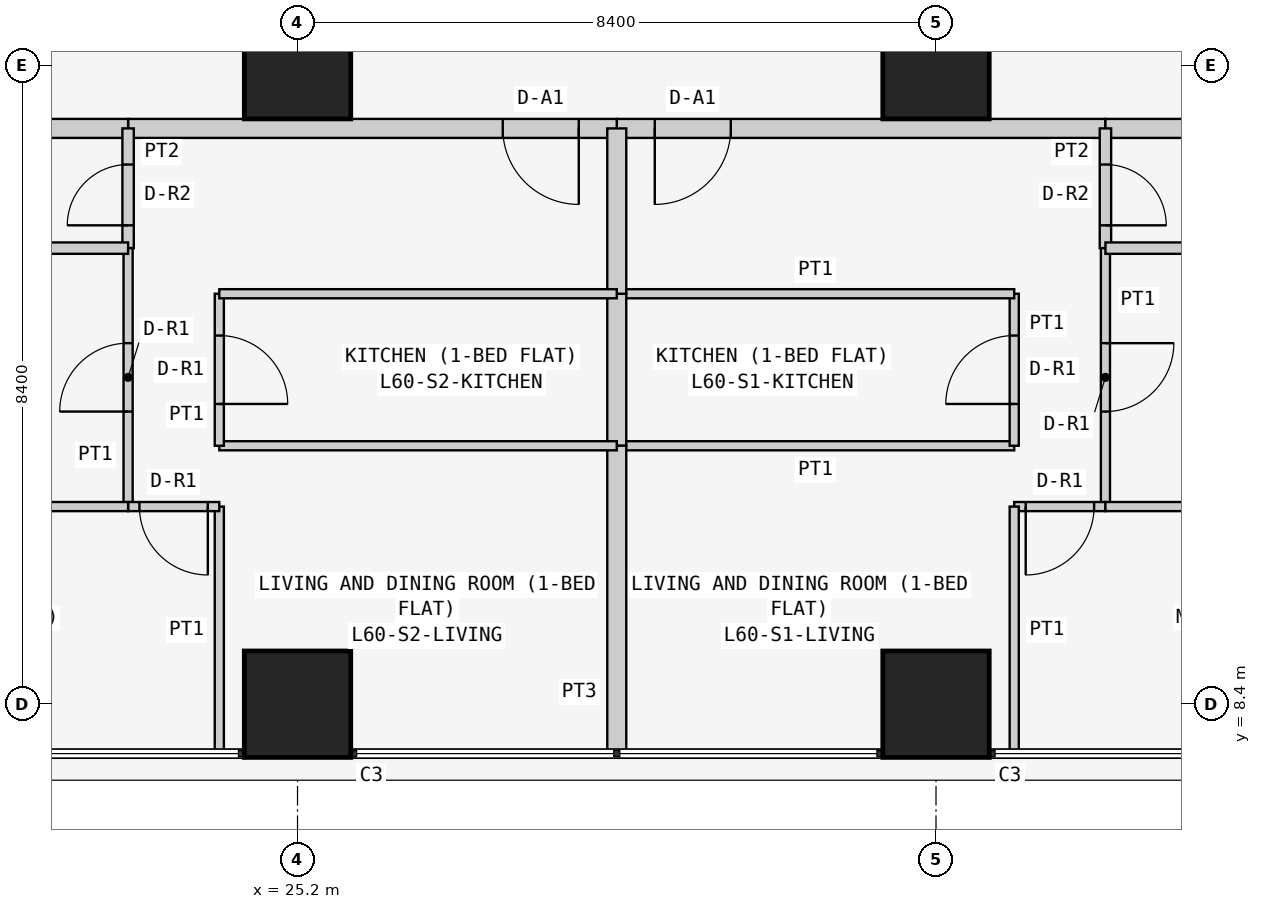
"""IFC4 building model, lengths in metres.
Left out: names, types, materials, properties, quantities, classifications, styles, units other than length and angle.
Written with IfcOpenShell. Run it as: python <this file> out.ifc"""

import sys

from ifc_helpers import new_model, si_unit, direction, frame, frame_2d, origin, origin_2d, place, context, subcontext, project, spatial, rectangle, extrude, element, fill, save


model = new_model("IFC4")
c1 = context("Model", 3, precision=1e-05, world=origin(), true_north=direction((0.0, 1.0)))
c2 = subcontext(c1, "Body", "Model", "MODEL_VIEW")
j1 = project(units=[si_unit("LENGTHUNIT", "METRE"), si_unit("PLANEANGLEUNIT", "RADIAN")], contexts=[c1])
p1 = place(None, origin())
s1 = spatial("IfcSite", under=j1, at=p1, CompositionType="ELEMENT")
p2 = place(p1, origin())
s2 = spatial("IfcBuilding", under=s1, at=p2, CompositionType="ELEMENT")
p3 = place(p2, frame((0.0, 0.0, 230.1)))
s3 = spatial("IfcBuildingStorey", under=s2, at=p3, CompositionType="ELEMENT", Elevation=230.1)
for number, where, z_axis, x_axis in (
    (1, (25.2, 8.4, 0.0), (0.0, 0.0, 1.0), (1.0, 0.0, 0.0)),
    (2, (25.2, 16.8, 0.0), (0.0, 0.0, 1.0), (1.0, 0.0, 0.0)),
    (3, (33.6, 8.4, 0.0), (0.0, 0.0, 1.0), (1.0, 0.0, 0.0)),
    (4, (33.6, 16.8, 0.0), (0.0, 0.0, 1.0), (1.0, 0.0, 0.0)),
):
    element("IfcColumn", number, at=place(p3, frame(where, z_axis=z_axis, x_axis=x_axis)), inside=s3, PredefinedType="COLUMN", context=c2, shape_type="SweptSolid", body=[
        extrude(rectangle(XDim=1.4, YDim=1.4, at=origin_2d()), origin(), (0.0, 0.0, 1.0), 3.6),
    ])
p4 = place(p3, frame((35.829, 15.975, 0.0), z_axis=(0.0, 0.0, 1.0), x_axis=(-1.0, 0.0, 0.0)))
e5 = element("IfcWall", 5, at=p4, inside=s3, PredefinedType="PARTITIONING", context=c2, shape_type="SweptSolid", body=[
    extrude(rectangle(XDim=6.429, YDim=0.25, at=frame_2d((3.215, 0.0))), origin(), (0.0, 0.0, 1.0), 3.45),
])
p5 = place(p4, frame((4.929, 0.0, 0.0)))
e6 = element("IfcOpeningElement", 6, at=p5, cuts=e5, PredefinedType="OPENING", context=c2, shape_type="SweptSolid", body=[
    extrude(rectangle(XDim=1.0, YDim=2.1, at=frame_2d((0.5, 1.05))), frame((0.0, 0.135, 0.0), z_axis=(0.0, -1.0, 0.0), x_axis=(1.0, 0.0, 0.0)), (0.0, 0.0, 1.0), 0.27),
])
p6 = place(p3, frame((42.7, 15.975, 0.0), z_axis=(0.0, 0.0, 1.0), x_axis=(-1.0, 0.0, 0.0)))
e7 = element("IfcWall", 7, at=p6, inside=s3, PredefinedType="PARTITIONING", context=c2, shape_type="SweptSolid", body=[
    extrude(rectangle(XDim=6.871, YDim=0.25, at=frame_2d((3.436, 0.0))), origin(), (0.0, 0.0, 1.0), 3.45),
])
p7 = place(p3, frame((29.4, 15.975, 0.0), z_axis=(0.0, 0.0, 1.0), x_axis=(-1.0, 0.0, 0.0)))
e8 = element("IfcWall", 8, at=p7, inside=s3, PredefinedType="PARTITIONING", context=c2, shape_type="SweptSolid", body=[
    extrude(rectangle(XDim=6.429, YDim=0.25, at=frame_2d((3.214, 0.0))), origin(), (0.0, 0.0, 1.0), 3.45),
])
p8 = place(p7, frame((0.5, 0.0, 0.0)))
e9 = element("IfcOpeningElement", 9, at=p8, cuts=e8, PredefinedType="OPENING", context=c2, shape_type="SweptSolid", body=[
    extrude(rectangle(XDim=1.0, YDim=2.1, at=frame_2d((0.5, 1.05))), frame((0.0, 0.135, 0.0), z_axis=(0.0, -1.0, 0.0), x_axis=(1.0, 0.0, 0.0)), (0.0, 0.0, 1.0), 0.27),
])
p9 = place(p3, frame((22.971, 15.975, 0.0), z_axis=(0.0, 0.0, 1.0), x_axis=(-1.0, 0.0, 0.0)))
e10 = element("IfcWall", 10, at=p9, inside=s3, PredefinedType="PARTITIONING", context=c2, shape_type="SweptSolid", body=[
    extrude(rectangle(XDim=6.871, YDim=0.25, at=frame_2d((3.436, 0.0))), origin(), (0.0, 0.0, 1.0), 3.45),
])
p10 = place(p3, frame((29.4, 11.8, 0.0), z_axis=(0.0, 0.0, 1.0), x_axis=(1.0, 0.0, 0.0)))
e11 = element("IfcWall", 11, at=p10, inside=s3, PredefinedType="PARTITIONING", context=c2, shape_type="SweptSolid", body=[
    extrude(rectangle(XDim=5.229, YDim=0.12, at=frame_2d((2.615, 0.0))), origin(), (0.0, 0.0, 1.0), 3.45),
])
p11 = place(p3, frame((34.629, 11.8, 0.0), z_axis=(0.0, 0.0, 1.0), x_axis=(0.0, 1.0, 0.0)))
e12 = element("IfcWall", 12, at=p11, inside=s3, PredefinedType="PARTITIONING", context=c2, shape_type="SweptSolid", body=[
    extrude(rectangle(XDim=2.0, YDim=0.12, at=frame_2d((1.0, 0.0))), origin(), (0.0, 0.0, 1.0), 3.45),
])
p12 = place(p11, frame((0.55, 0.0, 0.0)))
e13 = element("IfcOpeningElement", 13, at=p12, cuts=e12, PredefinedType="OPENING", context=c2, shape_type="SweptSolid", body=[
    extrude(rectangle(XDim=0.9, YDim=2.1, at=frame_2d((0.45, 1.05))), frame((0.0, 0.07, 0.0), z_axis=(0.0, -1.0, 0.0), x_axis=(1.0, 0.0, 0.0)), (0.0, 0.0, 1.0), 0.14),
])
p13 = place(p3, frame((34.629, 13.8, 0.0), z_axis=(0.0, 0.0, 1.0), x_axis=(-1.0, 0.0, 0.0)))
e14 = element("IfcWall", 14, at=p13, inside=s3, PredefinedType="PARTITIONING", context=c2, shape_type="SweptSolid", body=[
    extrude(rectangle(XDim=5.229, YDim=0.12, at=frame_2d((2.615, 0.0))), origin(), (0.0, 0.0, 1.0), 3.45),
])
p14 = place(p3, frame((29.4, 13.8, 0.0), z_axis=(0.0, 0.0, 1.0), x_axis=(0.0, -1.0, 0.0)))
e15 = element("IfcWall", 15, at=p14, inside=s3, PredefinedType="PARTITIONING", context=c2, shape_type="SweptSolid", body=[
    extrude(rectangle(XDim=2.0, YDim=0.25, at=frame_2d((1.0, 0.0))), origin(), (0.0, 0.0, 1.0), 2.848),
])
p15 = place(p3, frame((35.829, 15.975, 0.0), z_axis=(0.0, 0.0, 1.0), x_axis=(0.0, -1.0, 0.0)))
e16 = element("IfcWall", 16, at=p15, inside=s3, PredefinedType="PARTITIONING", context=c2, shape_type="SweptSolid", body=[
    extrude(rectangle(XDim=1.575, YDim=0.15, at=frame_2d((0.788, 0.0))), origin(), (0.0, 0.0, 1.0), 3.45),
])
p16 = place(p15, frame((0.475, 0.0, 0.0)))
e17 = element("IfcOpeningElement", 17, at=p16, cuts=e16, PredefinedType="OPENING", context=c2, shape_type="SweptSolid", body=[
    extrude(rectangle(XDim=0.8, YDim=2.1, at=frame_2d((0.4, 1.05))), frame((0.0, 0.085, 0.0), z_axis=(0.0, -1.0, 0.0), x_axis=(1.0, 0.0, 0.0)), (0.0, 0.0, 1.0), 0.17),
])
p17 = place(p3, frame((35.829, 14.4, 0.0), z_axis=(0.0, 0.0, 1.0), x_axis=(0.0, -1.0, 0.0)))
e18 = element("IfcWall", 18, at=p17, inside=s3, PredefinedType="PARTITIONING", context=c2, shape_type="SweptSolid", body=[
    extrude(rectangle(XDim=3.4, YDim=0.12, at=frame_2d((1.7, 0.0))), origin(), (0.0, 0.0, 1.0), 3.45),
])
p18 = place(p17, frame((1.25, 0.0, 0.0)))
e19 = element("IfcOpeningElement", 19, at=p18, cuts=e18, PredefinedType="OPENING", context=c2, shape_type="SweptSolid", body=[
    extrude(rectangle(XDim=0.9, YDim=2.1, at=frame_2d((0.45, 1.05))), frame((0.0, 0.07, 0.0), z_axis=(0.0, -1.0, 0.0), x_axis=(1.0, 0.0, 0.0)), (0.0, 0.0, 1.0), 0.14),
])
p19 = place(p3, frame((35.829, 11.0, 0.0), z_axis=(0.0, 0.0, 1.0), x_axis=(-1.0, 0.0, 0.0)))
e20 = element("IfcWall", 20, at=p19, inside=s3, PredefinedType="PARTITIONING", context=c2, shape_type="SweptSolid", body=[
    extrude(rectangle(XDim=1.2, YDim=0.12, at=frame_2d((0.6, 0.0))), origin(), (0.0, 0.0, 1.0), 3.45),
])
p20 = place(p19, frame((0.149, 0.0, 0.0)))
e21 = element("IfcOpeningElement", 21, at=p20, cuts=e20, PredefinedType="OPENING", context=c2, shape_type="SweptSolid", body=[
    extrude(rectangle(XDim=0.9, YDim=2.1, at=frame_2d((0.45, 1.05))), frame((0.0, 0.07, 0.0), z_axis=(0.0, -1.0, 0.0), x_axis=(1.0, 0.0, 0.0)), (0.0, 0.0, 1.0), 0.14),
])
p21 = place(p3, frame((34.629, 11.0, 0.0), z_axis=(0.0, 0.0, 1.0), x_axis=(0.0, -1.0, 0.0)))
e22 = element("IfcWall", 22, at=p21, inside=s3, PredefinedType="PARTITIONING", context=c2, shape_type="SweptSolid", body=[
    extrude(rectangle(XDim=3.25, YDim=0.12, at=frame_2d((1.625, 0.0))), origin(), (0.0, 0.0, 1.0), 3.45),
])
p22 = place(p3, frame((29.4, 7.75, 0.0), z_axis=(0.0, 0.0, 1.0), x_axis=(0.0, 1.0, 0.0)))
e23 = element("IfcWall", 23, at=p22, inside=s3, PredefinedType="PARTITIONING", context=c2, shape_type="SweptSolid", body=[
    extrude(rectangle(XDim=4.05, YDim=0.25, at=frame_2d((2.025, 0.0))), origin(), (0.0, 0.0, 1.0), 2.848),
])
p23 = place(p3, frame((29.4, 13.8, 0.0), z_axis=(0.0, 0.0, 1.0), x_axis=(0.0, 1.0, 0.0)))
e24 = element("IfcWall", 24, at=p23, inside=s3, PredefinedType="PARTITIONING", context=c2, shape_type="SweptSolid", body=[
    extrude(rectangle(XDim=2.175, YDim=0.25, at=frame_2d((1.087, 0.0))), origin(), (0.0, 0.0, 1.0), 2.848),
])
p24 = place(p3, frame((35.829, 14.4, 0.0), z_axis=(0.0, 0.0, 1.0), x_axis=(1.0, 0.0, 0.0)))
e25 = element("IfcWall", 25, at=p24, inside=s3, PredefinedType="PARTITIONING", context=c2, shape_type="SweptSolid", body=[
    extrude(rectangle(XDim=6.871, YDim=0.15, at=frame_2d((3.436, 0.0))), origin(), (0.0, 0.0, 1.0), 3.45),
])
p25 = place(p3, frame((35.829, 11.0, 0.0), z_axis=(0.0, 0.0, 1.0), x_axis=(1.0, 0.0, 0.0)))
e26 = element("IfcWall", 26, at=p25, inside=s3, PredefinedType="PARTITIONING", context=c2, shape_type="SweptSolid", body=[
    extrude(rectangle(XDim=6.871, YDim=0.12, at=frame_2d((3.436, 0.0))), origin(), (0.0, 0.0, 1.0), 3.45),
])
p26 = place(p3, frame((29.4, 11.8, 0.0), z_axis=(0.0, 0.0, 1.0), x_axis=(-1.0, 0.0, 0.0)))
e27 = element("IfcWall", 27, at=p26, inside=s3, PredefinedType="PARTITIONING", context=c2, shape_type="SweptSolid", body=[
    extrude(rectangle(XDim=5.229, YDim=0.12, at=frame_2d((2.615, 0.0))), origin(), (0.0, 0.0, 1.0), 3.45),
])
p27 = place(p3, frame((24.171, 11.8, 0.0), z_axis=(0.0, 0.0, 1.0), x_axis=(0.0, 1.0, 0.0)))
e28 = element("IfcWall", 28, at=p27, inside=s3, PredefinedType="PARTITIONING", context=c2, shape_type="SweptSolid", body=[
    extrude(rectangle(XDim=2.0, YDim=0.12, at=frame_2d((1.0, 0.0))), origin(), (0.0, 0.0, 1.0), 3.45),
])
p28 = place(p27, frame((0.55, 0.0, 0.0)))
e29 = element("IfcOpeningElement", 29, at=p28, cuts=e28, PredefinedType="OPENING", context=c2, shape_type="SweptSolid", body=[
    extrude(rectangle(XDim=0.9, YDim=2.1, at=frame_2d((0.45, 1.05))), frame((0.0, 0.07, 0.0), z_axis=(0.0, -1.0, 0.0), x_axis=(1.0, 0.0, 0.0)), (0.0, 0.0, 1.0), 0.14),
])
p29 = place(p3, frame((24.171, 13.8, 0.0), z_axis=(0.0, 0.0, 1.0), x_axis=(1.0, 0.0, 0.0)))
e30 = element("IfcWall", 30, at=p29, inside=s3, PredefinedType="PARTITIONING", context=c2, shape_type="SweptSolid", body=[
    extrude(rectangle(XDim=5.229, YDim=0.12, at=frame_2d((2.615, 0.0))), origin(), (0.0, 0.0, 1.0), 3.45),
])
p30 = place(p3, frame((22.971, 14.4, 0.0), z_axis=(0.0, 0.0, 1.0), x_axis=(0.0, 1.0, 0.0)))
e31 = element("IfcWall", 31, at=p30, inside=s3, PredefinedType="PARTITIONING", context=c2, shape_type="SweptSolid", body=[
    extrude(rectangle(XDim=1.575, YDim=0.15, at=frame_2d((0.788, 0.0))), origin(), (0.0, 0.0, 1.0), 3.45),
])
p31 = place(p30, frame((0.3, 0.0, 0.0)))
e32 = element("IfcOpeningElement", 32, at=p31, cuts=e31, PredefinedType="OPENING", context=c2, shape_type="SweptSolid", body=[
    extrude(rectangle(XDim=0.8, YDim=2.1, at=frame_2d((0.4, 1.05))), frame((0.0, 0.085, 0.0), z_axis=(0.0, -1.0, 0.0), x_axis=(1.0, 0.0, 0.0)), (0.0, 0.0, 1.0), 0.17),
])
p32 = place(p3, frame((22.971, 11.0, 0.0), z_axis=(0.0, 0.0, 1.0), x_axis=(0.0, 1.0, 0.0)))
e33 = element("IfcWall", 33, at=p32, inside=s3, PredefinedType="PARTITIONING", context=c2, shape_type="SweptSolid", body=[
    extrude(rectangle(XDim=3.4, YDim=0.12, at=frame_2d((1.7, 0.0))), origin(), (0.0, 0.0, 1.0), 3.45),
])
p33 = place(p32, frame((1.25, 0.0, 0.0)))
e34 = element("IfcOpeningElement", 34, at=p33, cuts=e33, PredefinedType="OPENING", context=c2, shape_type="SweptSolid", body=[
    extrude(rectangle(XDim=0.9, YDim=2.1, at=frame_2d((0.45, 1.05))), frame((0.0, 0.07, 0.0), z_axis=(0.0, -1.0, 0.0), x_axis=(1.0, 0.0, 0.0)), (0.0, 0.0, 1.0), 0.14),
])
p34 = place(p3, frame((24.171, 7.75, 0.0), z_axis=(0.0, 0.0, 1.0), x_axis=(0.0, 1.0, 0.0)))
e35 = element("IfcWall", 35, at=p34, inside=s3, PredefinedType="PARTITIONING", context=c2, shape_type="SweptSolid", body=[
    extrude(rectangle(XDim=3.25, YDim=0.12, at=frame_2d((1.625, 0.0))), origin(), (0.0, 0.0, 1.0), 3.45),
])
p35 = place(p3, frame((24.171, 11.0, 0.0), z_axis=(0.0, 0.0, 1.0), x_axis=(-1.0, 0.0, 0.0)))
e36 = element("IfcWall", 36, at=p35, inside=s3, PredefinedType="PARTITIONING", context=c2, shape_type="SweptSolid", body=[
    extrude(rectangle(XDim=1.2, YDim=0.12, at=frame_2d((0.6, 0.0))), origin(), (0.0, 0.0, 1.0), 3.45),
])
p36 = place(p35, frame((0.151, 0.0, 0.0)))
e37 = element("IfcOpeningElement", 37, at=p36, cuts=e36, PredefinedType="OPENING", context=c2, shape_type="SweptSolid", body=[
    extrude(rectangle(XDim=0.9, YDim=2.1, at=frame_2d((0.45, 1.05))), frame((0.0, 0.07, 0.0), z_axis=(0.0, -1.0, 0.0), x_axis=(1.0, 0.0, 0.0)), (0.0, 0.0, 1.0), 0.14),
])
p37 = place(p3, frame((22.971, 14.4, 0.0), z_axis=(0.0, 0.0, 1.0), x_axis=(-1.0, 0.0, 0.0)))
e38 = element("IfcWall", 38, at=p37, inside=s3, PredefinedType="PARTITIONING", context=c2, shape_type="SweptSolid", body=[
    extrude(rectangle(XDim=6.871, YDim=0.15, at=frame_2d((3.436, 0.0))), origin(), (0.0, 0.0, 1.0), 3.45),
])
p38 = place(p3, frame((22.971, 11.0, 0.0), z_axis=(0.0, 0.0, 1.0), x_axis=(-1.0, 0.0, 0.0)))
e39 = element("IfcWall", 39, at=p38, inside=s3, PredefinedType="PARTITIONING", context=c2, shape_type="SweptSolid", body=[
    extrude(rectangle(XDim=6.871, YDim=0.12, at=frame_2d((3.436, 0.0))), origin(), (0.0, 0.0, 1.0), 3.45),
])
p39 = place(p5, origin())
e40 = element("IfcDoor", 40, at=p39, inside=s3, OperationType="SINGLE_SWING_RIGHT", PredefinedType="DOOR", context=c2, shape_type="SweptSolid", body=[
    extrude(rectangle(XDim=1.0, YDim=2.1, at=frame_2d((0.5, 1.05))), frame((0.0, 0.025, 0.0), z_axis=(0.0, -1.0, 0.0), x_axis=(1.0, 0.0, 0.0)), (0.0, 0.0, 1.0), 0.05),
])
fill(e6, e40)
p40 = place(p12, origin())
e41 = element("IfcDoor", 41, at=p40, inside=s3, OperationType="SINGLE_SWING_LEFT", PredefinedType="DOOR", context=c2, shape_type="SweptSolid", body=[
    extrude(rectangle(XDim=0.9, YDim=2.1, at=frame_2d((0.45, 1.05))), frame((0.0, 0.025, 0.0), z_axis=(0.0, -1.0, 0.0), x_axis=(1.0, 0.0, 0.0)), (0.0, 0.0, 1.0), 0.05),
])
fill(e13, e41)
p41 = place(p16, origin())
e42 = element("IfcDoor", 42, at=p41, inside=s3, OperationType="SINGLE_SWING_RIGHT", PredefinedType="DOOR", context=c2, shape_type="SweptSolid", body=[
    extrude(rectangle(XDim=0.8, YDim=2.1, at=frame_2d((0.4, 1.05))), frame((0.0, 0.025, 0.0), z_axis=(0.0, -1.0, 0.0), x_axis=(1.0, 0.0, 0.0)), (0.0, 0.0, 1.0), 0.05),
])
fill(e17, e42)
p42 = place(p18, origin())
e43 = element("IfcDoor", 43, at=p42, inside=s3, OperationType="SINGLE_SWING_LEFT", PredefinedType="DOOR", context=c2, shape_type="SweptSolid", body=[
    extrude(rectangle(XDim=0.9, YDim=2.1, at=frame_2d((0.45, 1.05))), frame((0.0, 0.025, 0.0), z_axis=(0.0, -1.0, 0.0), x_axis=(1.0, 0.0, 0.0)), (0.0, 0.0, 1.0), 0.05),
])
fill(e19, e43)
p43 = place(p20, origin())
e44 = element("IfcDoor", 44, at=p43, inside=s3, OperationType="SINGLE_SWING_RIGHT", PredefinedType="DOOR", context=c2, shape_type="SweptSolid", body=[
    extrude(rectangle(XDim=0.9, YDim=2.1, at=frame_2d((0.45, 1.05))), frame((0.0, 0.025, 0.0), z_axis=(0.0, -1.0, 0.0), x_axis=(1.0, 0.0, 0.0)), (0.0, 0.0, 1.0), 0.05),
])
fill(e21, e44)
p44 = place(p8, origin())
e45 = element("IfcDoor", 45, at=p44, inside=s3, OperationType="SINGLE_SWING_LEFT", PredefinedType="DOOR", context=c2, shape_type="SweptSolid", body=[
    extrude(rectangle(XDim=1.0, YDim=2.1, at=frame_2d((0.5, 1.05))), frame((0.0, 0.025, 0.0), z_axis=(0.0, -1.0, 0.0), x_axis=(1.0, 0.0, 0.0)), (0.0, 0.0, 1.0), 0.05),
])
fill(e9, e45)
p45 = place(p28, frame((0.9, 0.0, 0.0), z_axis=(0.0, 0.0, 1.0), x_axis=(-1.0, 0.0, 0.0)))
e46 = element("IfcDoor", 46, at=p45, inside=s3, OperationType="SINGLE_SWING_RIGHT", PredefinedType="DOOR", context=c2, shape_type="SweptSolid", body=[
    extrude(rectangle(XDim=0.9, YDim=2.1, at=frame_2d((0.45, 1.05))), frame((0.0, 0.025, 0.0), z_axis=(0.0, -1.0, 0.0), x_axis=(1.0, 0.0, 0.0)), (0.0, 0.0, 1.0), 0.05),
])
fill(e29, e46)
p46 = place(p31, origin())
e47 = element("IfcDoor", 47, at=p46, inside=s3, OperationType="SINGLE_SWING_LEFT", PredefinedType="DOOR", context=c2, shape_type="SweptSolid", body=[
    extrude(rectangle(XDim=0.8, YDim=2.1, at=frame_2d((0.4, 1.05))), frame((0.0, 0.025, 0.0), z_axis=(0.0, -1.0, 0.0), x_axis=(1.0, 0.0, 0.0)), (0.0, 0.0, 1.0), 0.05),
])
fill(e32, e47)
p47 = place(p33, origin())
e48 = element("IfcDoor", 48, at=p47, inside=s3, OperationType="SINGLE_SWING_LEFT", PredefinedType="DOOR", context=c2, shape_type="SweptSolid", body=[
    extrude(rectangle(XDim=0.9, YDim=2.1, at=frame_2d((0.45, 1.05))), frame((0.0, 0.025, 0.0), z_axis=(0.0, -1.0, 0.0), x_axis=(1.0, 0.0, 0.0)), (0.0, 0.0, 1.0), 0.05),
])
fill(e34, e48)
p48 = place(p36, origin())
e49 = element("IfcDoor", 49, at=p48, inside=s3, OperationType="SINGLE_SWING_LEFT", PredefinedType="DOOR", context=c2, shape_type="SweptSolid", body=[
    extrude(rectangle(XDim=0.9, YDim=2.1, at=frame_2d((0.45, 1.05))), frame((0.0, 0.025, 0.0), z_axis=(0.0, -1.0, 0.0), x_axis=(1.0, 0.0, 0.0)), (0.0, 0.0, 1.0), 0.05),
])
fill(e37, e49)
save(model, sys.argv[1])
